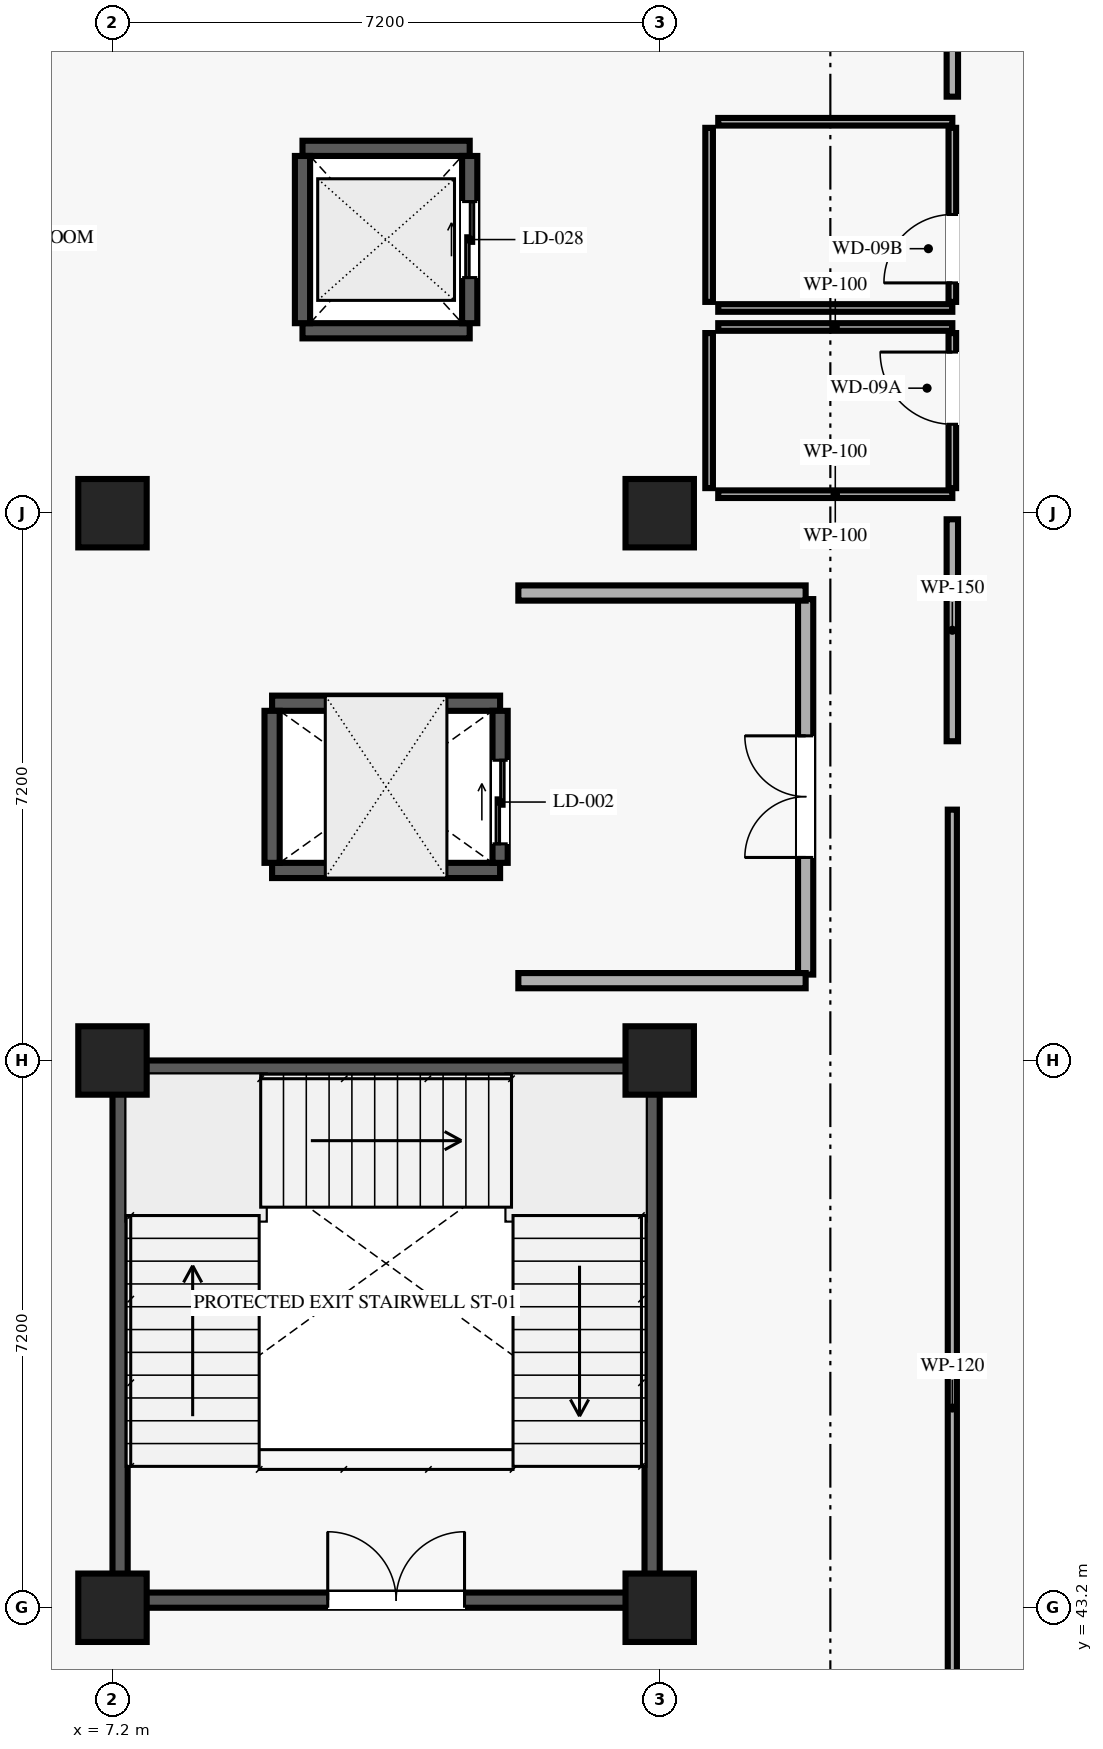
"""IFC4 building model, lengths in metres.
Left out: names, types, materials, properties, quantities, classifications, styles, units other than length and angle.
Written with IfcOpenShell. Run it as: python <this file> out.ifc"""

import sys

from ifc_helpers import new_model, si_unit, direction, frame, frame_2d, origin, origin_2d, place, context, subcontext, project, spatial, rectangle, extrude, element, fill, save


model = new_model("IFC4")
c1 = context("Model", 3, precision=1e-05, world=origin(), true_north=direction((0.0, 1.0)))
c2 = subcontext(c1, "Body", "Model", "MODEL_VIEW")
j1 = project(units=[si_unit("LENGTHUNIT", "METRE"), si_unit("PLANEANGLEUNIT", "RADIAN")], contexts=[c1])
p1 = place(None, origin())
s1 = spatial("IfcSite", under=j1, at=p1, CompositionType="ELEMENT")
p2 = place(p1, origin())
s2 = spatial("IfcBuilding", under=s1, at=p2, CompositionType="ELEMENT")
p3 = place(p2, origin())
s3 = spatial("IfcBuildingStorey", under=s2, at=p3, CompositionType="ELEMENT", Elevation=0.0)
for number, where, z_axis, x_axis in (
    (1, (7.2, 43.2, 0.0), (0.0, 0.0, 1.0), (1.0, 0.0, 0.0)),
    (2, (7.2, 50.4, 0.0), (0.0, 0.0, 1.0), (1.0, 0.0, 0.0)),
    (3, (7.2, 57.6, 0.0), (0.0, 0.0, 1.0), (1.0, 0.0, 0.0)),
    (4, (14.4, 43.2, 0.0), (0.0, 0.0, 1.0), (1.0, 0.0, 0.0)),
    (5, (14.4, 50.4, 0.0), (0.0, 0.0, 1.0), (1.0, 0.0, 0.0)),
    (6, (14.4, 57.6, 0.0), (0.0, 0.0, 1.0), (1.0, 0.0, 0.0)),
):
    element("IfcColumn", number, at=place(p3, frame(where, z_axis=z_axis, x_axis=x_axis)), inside=s3, PredefinedType="COLUMN", context=c2, shape_type="SweptSolid", body=[
        extrude(rectangle(XDim=0.9, YDim=0.9, at=origin_2d()), origin(), (0.0, 0.0, 1.0), 5.4),
    ])
p4 = place(p3, frame((7.4, 43.3, 0.0), z_axis=(0.0, 0.0, 1.0), x_axis=(1.0, 0.0, 0.0)))
e7 = element("IfcWall", 7, at=p4, inside=s3, PredefinedType="SHEAR", context=c2, shape_type="SweptSolid", body=[
    extrude(rectangle(XDim=6.8, YDim=0.2, at=frame_2d((3.4, 0.0))), origin(), (0.0, 0.0, 1.0), 5.16),
])
p5 = place(p4, frame((2.632, 0.0, 0.0)))
e8 = element("IfcOpeningElement", 8, at=p5, cuts=e7, PredefinedType="OPENING", context=c2, shape_type="SweptSolid", body=[
    extrude(rectangle(XDim=1.8, YDim=2.2, at=frame_2d((0.9, 1.1))), frame((0.0, 0.11, 0.0), z_axis=(0.0, -1.0, 0.0), x_axis=(1.0, 0.0, 0.0)), (0.0, 0.0, 1.0), 0.22),
])
for number, where, z_axis, x_axis in (
    (9, (7.4, 50.3, 0.0), (0.0, 0.0, 1.0), (1.0, 0.0, 0.0)),
    (10, (7.3, 43.4, 0.0), (0.0, 0.0, 1.0), (0.0, 1.0, 0.0)),
    (11, (14.3, 43.4, 0.0), (0.0, 0.0, 1.0), (0.0, 1.0, 0.0)),
):
    element("IfcWall", number, at=place(p3, frame(where, z_axis=z_axis, x_axis=x_axis)), inside=s3, PredefinedType="SHEAR", context=c2, shape_type="SweptSolid", body=[
        extrude(rectangle(XDim=6.8, YDim=0.2, at=frame_2d((3.4, 0.0))), origin(), (0.0, 0.0, 1.0), 5.16),
    ])
for number, where, z_axis, x_axis in (
    (12, (9.3, 52.9, 0.0), (0.0, 0.0, 1.0), (1.0, 0.0, 0.0)),
    (13, (9.3, 55.1, 0.0), (0.0, 0.0, 1.0), (1.0, 0.0, 0.0)),
):
    element("IfcWall", number, at=place(p3, frame(where, z_axis=z_axis, x_axis=x_axis)), inside=s3, PredefinedType="SHEAR", context=c2, shape_type="SweptSolid", body=[
        extrude(rectangle(XDim=3.0, YDim=0.2, at=frame_2d((1.5, 0.0))), origin(), (0.0, 0.0, 1.0), 5.16),
    ])
p6 = place(p3, frame((9.3, 53.0, 0.0), z_axis=(0.0, 0.0, 1.0), x_axis=(0.0, 1.0, 0.0)))
e14 = element("IfcWall", 14, at=p6, inside=s3, PredefinedType="SHEAR", context=c2, shape_type="SweptSolid", body=[
    extrude(rectangle(XDim=2.0, YDim=0.2, at=frame_2d((1.0, 0.0))), origin(), (0.0, 0.0, 1.0), 5.16),
])
p7 = place(p3, frame((12.3, 53.0, 0.0), z_axis=(0.0, 0.0, 1.0), x_axis=(0.0, 1.0, 0.0)))
e15 = element("IfcWall", 15, at=p7, inside=s3, PredefinedType="SHEAR", context=c2, shape_type="SweptSolid", body=[
    extrude(rectangle(XDim=2.0, YDim=0.2, at=frame_2d((1.0, 0.0))), origin(), (0.0, 0.0, 1.0), 5.16),
])
p8 = place(p7, frame((0.25, 0.0, 0.0)))
e16 = element("IfcOpeningElement", 16, at=p8, cuts=e15, PredefinedType="OPENING", context=c2, shape_type="SweptSolid", body=[
    extrude(rectangle(XDim=1.1, YDim=2.15, at=frame_2d((0.55, 1.075))), frame((0.0, 0.11, 0.0), z_axis=(0.0, -1.0, 0.0), x_axis=(1.0, 0.0, 0.0)), (0.0, 0.0, 1.0), 0.22),
])
for number, where, z_axis, x_axis in (
    (17, (9.7, 60.0, 0.0), (0.0, 0.0, 1.0), (1.0, 0.0, 0.0)),
    (18, (9.7, 62.4, 0.0), (0.0, 0.0, 1.0), (1.0, 0.0, 0.0)),
    (19, (9.7, 60.1, 0.0), (0.0, 0.0, 1.0), (0.0, 1.0, 0.0)),
):
    element("IfcWall", number, at=place(p3, frame(where, z_axis=z_axis, x_axis=x_axis)), inside=s3, PredefinedType="SHEAR", context=c2, shape_type="SweptSolid", body=[
        extrude(rectangle(XDim=2.2, YDim=0.2, at=frame_2d((1.1, 0.0))), origin(), (0.0, 0.0, 1.0), 5.16),
    ])
p9 = place(p3, frame((11.9, 60.1, 0.0), z_axis=(0.0, 0.0, 1.0), x_axis=(0.0, 1.0, 0.0)))
e20 = element("IfcWall", 20, at=p9, inside=s3, PredefinedType="SHEAR", context=c2, shape_type="SweptSolid", body=[
    extrude(rectangle(XDim=2.2, YDim=0.2, at=frame_2d((1.1, 0.0))), origin(), (0.0, 0.0, 1.0), 5.16),
])
p10 = place(p9, frame((0.6, 0.0, 0.0)))
e21 = element("IfcOpeningElement", 21, at=p10, cuts=e20, PredefinedType="OPENING", context=c2, shape_type="SweptSolid", body=[
    extrude(rectangle(XDim=1.0, YDim=2.1, at=frame_2d((0.5, 1.05))), frame((0.0, 0.11, 0.0), z_axis=(0.0, -1.0, 0.0), x_axis=(1.0, 0.0, 0.0)), (0.0, 0.0, 1.0), 0.22),
])
p11 = place(p3, frame((16.32, 51.53, 0.0), z_axis=(0.0, 0.0, 1.0), x_axis=(0.0, 1.0, 0.0)))
e22 = element("IfcWall", 22, at=p11, inside=s3, PredefinedType="SOLIDWALL", context=c2, shape_type="SweptSolid", body=[
    extrude(rectangle(XDim=4.94, YDim=0.2, at=frame_2d((2.47, 0.0))), origin(), (0.0, 0.0, 1.0), 5.16),
])
p12 = place(p11, frame((1.541, 0.0, 0.0)))
e23 = element("IfcOpeningElement", 23, at=p12, cuts=e22, PredefinedType="OPENING", context=c2, shape_type="SweptSolid", body=[
    extrude(rectangle(XDim=1.6, YDim=2.2, at=frame_2d((0.8, 1.1))), frame((0.0, 0.11, 0.0), z_axis=(0.0, -1.0, 0.0), x_axis=(1.0, 0.0, 0.0)), (0.0, 0.0, 1.0), 0.22),
])
for number, where, z_axis, x_axis in (
    (24, (12.54, 51.45, 0.0), (0.0, 0.0, 1.0), (1.0, 0.0, 0.0)),
    (25, (12.54, 56.55, 0.0), (0.0, 0.0, 1.0), (1.0, 0.0, 0.0)),
):
    element("IfcWall", number, at=place(p3, frame(where, z_axis=z_axis, x_axis=x_axis)), inside=s3, PredefinedType="SOLIDWALL", context=c2, shape_type="SweptSolid", body=[
        extrude(rectangle(XDim=3.78, YDim=0.2, at=frame_2d((1.89, 0.0))), origin(), (0.0, 0.0, 1.0), 5.16),
    ])
p13 = place(p3, frame((18.25, 57.93, 0.0), z_axis=(0.0, 0.0, 1.0), x_axis=(0.0, 1.0, 0.0)))
e26 = element("IfcWall", 26, at=p13, inside=s3, PredefinedType="PARTITIONING", context=c2, shape_type="SweptSolid", body=[
    extrude(rectangle(XDim=2.04, YDim=0.1, at=frame_2d((1.02, 0.0))), origin(), (0.0, 0.0, 1.0), 5.16),
])
p14 = place(p13, frame((0.84, 0.0, 0.0)))
e27 = element("IfcOpeningElement", 27, at=p14, cuts=e26, PredefinedType="OPENING", context=c2, shape_type="SweptSolid", body=[
    extrude(rectangle(XDim=0.95, YDim=2.1, at=frame_2d((0.475, 1.05))), frame((0.0, 0.06, 0.0), z_axis=(0.0, -1.0, 0.0), x_axis=(1.0, 0.0, 0.0)), (0.0, 0.0, 1.0), 0.12),
])
p15 = place(p3, frame((15.17, 57.85, 0.0), z_axis=(0.0, 0.0, 1.0), x_axis=(1.0, 0.0, 0.0)))
e28 = element("IfcWall", 28, at=p15, inside=s3, PredefinedType="PARTITIONING", context=c2, shape_type="SweptSolid", body=[
    extrude(rectangle(XDim=3.08, YDim=0.1, at=frame_2d((1.54, 0.0))), origin(), (0.0, 0.0, 1.0), 4.5),
])
p16 = place(p3, frame((15.17, 60.05, 0.0), z_axis=(0.0, 0.0, 1.0), x_axis=(1.0, 0.0, 0.0)))
e29 = element("IfcWall", 29, at=p16, inside=s3, PredefinedType="PARTITIONING", context=c2, shape_type="SweptSolid", body=[
    extrude(rectangle(XDim=3.08, YDim=0.1, at=frame_2d((1.54, 0.0))), origin(), (0.0, 0.0, 1.0), 5.16),
])
p17 = place(p3, frame((15.05, 57.93, 0.0), z_axis=(0.0, 0.0, 1.0), x_axis=(0.0, 1.0, 0.0)))
e30 = element("IfcWall", 30, at=p17, inside=s3, PredefinedType="PARTITIONING", context=c2, shape_type="SweptSolid", body=[
    extrude(rectangle(XDim=2.04, YDim=0.1, at=frame_2d((1.02, 0.0))), origin(), (0.0, 0.0, 1.0), 5.16),
])
p18 = place(p3, frame((18.25, 60.38, 0.0), z_axis=(0.0, 0.0, 1.0), x_axis=(0.0, 1.0, 0.0)))
e31 = element("IfcWall", 31, at=p18, inside=s3, PredefinedType="PARTITIONING", context=c2, shape_type="SweptSolid", body=[
    extrude(rectangle(XDim=2.29, YDim=0.1, at=frame_2d((1.145, 0.0))), origin(), (0.0, 0.0, 1.0), 5.16),
])
p19 = place(p18, frame((0.25, 0.0, 0.0)))
e32 = element("IfcOpeningElement", 32, at=p19, cuts=e31, PredefinedType="OPENING", context=c2, shape_type="SweptSolid", body=[
    extrude(rectangle(XDim=0.9, YDim=2.1, at=frame_2d((0.45, 1.05))), frame((0.0, 0.06, 0.0), z_axis=(0.0, -1.0, 0.0), x_axis=(1.0, 0.0, 0.0)), (0.0, 0.0, 1.0), 0.12),
])
for number, where, z_axis, x_axis in (
    (33, (15.17, 60.3, 0.0), (0.0, 0.0, 1.0), (1.0, 0.0, 0.0)),
    (34, (15.17, 62.75, 0.0), (0.0, 0.0, 1.0), (1.0, 0.0, 0.0)),
):
    element("IfcWall", number, at=place(p3, frame(where, z_axis=z_axis, x_axis=x_axis)), inside=s3, PredefinedType="PARTITIONING", context=c2, shape_type="SweptSolid", body=[
        extrude(rectangle(XDim=3.08, YDim=0.1, at=frame_2d((1.54, 0.0))), origin(), (0.0, 0.0, 1.0), 5.16),
    ])
p20 = place(p3, frame((15.05, 60.38, 0.0), z_axis=(0.0, 0.0, 1.0), x_axis=(0.0, 1.0, 0.0)))
e35 = element("IfcWall", 35, at=p20, inside=s3, PredefinedType="PARTITIONING", context=c2, shape_type="SweptSolid", body=[
    extrude(rectangle(XDim=2.29, YDim=0.1, at=frame_2d((1.145, 0.0))), origin(), (0.0, 0.0, 1.0), 5.16),
])
p21 = place(p3, frame((18.25, 36.55, 0.0), z_axis=(0.0, 0.0, 1.0), x_axis=(0.0, 1.0, 0.0)))
e36 = element("IfcWall", 36, at=p21, inside=s3, PredefinedType="PARTITIONING", context=c2, shape_type="SweptSolid", body=[
    extrude(rectangle(XDim=17.15, YDim=0.12, at=frame_2d((8.575, 0.0))), origin(), (0.0, 0.0, 1.0), 5.16),
])
p22 = place(p21, frame((2.525, 0.0, 0.0)))
e37 = element("IfcOpeningElement", 37, at=p22, cuts=e36, PredefinedType="OPENING", context=c2, shape_type="SweptSolid", body=[
    extrude(rectangle(XDim=0.98, YDim=2.1, at=frame_2d((0.49, 1.05))), frame((0.0, 0.07, 0.0), z_axis=(0.0, -1.0, 0.0), x_axis=(1.0, 0.0, 0.0)), (0.0, 0.0, 1.0), 0.14),
])
p23 = place(p3, frame((18.25, 63.08, 0.0), z_axis=(0.0, 0.0, 1.0), x_axis=(0.0, 1.0, 0.0)))
e38 = element("IfcWall", 38, at=p23, inside=s3, PredefinedType="PARTITIONING", context=c2, shape_type="SweptSolid", body=[
    extrude(rectangle(XDim=8.62, YDim=0.15, at=frame_2d((4.31, 0.0))), origin(), (0.0, 0.0, 1.0), 5.16),
])
p24 = place(p23, frame((4.263, 0.0, 0.0)))
e39 = element("IfcOpeningElement", 39, at=p24, cuts=e38, PredefinedType="OPENING", context=c2, shape_type="SweptSolid", body=[
    extrude(rectangle(XDim=2.1, YDim=2.4, at=frame_2d((1.05, 1.2))), frame((0.0, 0.085, 0.0), z_axis=(0.0, -1.0, 0.0), x_axis=(1.0, 0.0, 0.0)), (0.0, 0.0, 1.0), 0.17),
])
p25 = place(p3, frame((18.25, 54.6, 0.0), z_axis=(0.0, 0.0, 1.0), x_axis=(0.0, 1.0, 0.0)))
e40 = element("IfcWall", 40, at=p25, inside=s3, PredefinedType="PARTITIONING", context=c2, shape_type="SweptSolid", body=[
    extrude(rectangle(XDim=2.92, YDim=0.15, at=frame_2d((1.46, 0.0))), origin(), (0.0, 0.0, 1.0), 5.16),
])
p26 = place(p5, origin())
e41 = element("IfcDoor", 41, at=p26, inside=s3, OperationType="DOUBLE_DOOR_SINGLE_SWING", PredefinedType="DOOR", context=c2, shape_type="SweptSolid", body=[
    extrude(rectangle(XDim=1.8, YDim=2.2, at=frame_2d((0.9, 1.1))), frame((0.0, 0.025, 0.0), z_axis=(0.0, -1.0, 0.0), x_axis=(1.0, 0.0, 0.0)), (0.0, 0.0, 1.0), 0.05),
])
fill(e8, e41)
p27 = place(p8, origin())
e42 = element("IfcDoor", 42, at=p27, inside=s3, OperationType="DOUBLE_DOOR_SLIDING", PredefinedType="DOOR", context=c2, shape_type="SweptSolid", body=[
    extrude(rectangle(XDim=1.1, YDim=2.15, at=frame_2d((0.55, 1.075))), frame((0.0, 0.025, 0.0), z_axis=(0.0, -1.0, 0.0), x_axis=(1.0, 0.0, 0.0)), (0.0, 0.0, 1.0), 0.05),
])
fill(e16, e42)
p28 = place(p10, origin())
e43 = element("IfcDoor", 43, at=p28, inside=s3, OperationType="DOUBLE_DOOR_SLIDING", PredefinedType="DOOR", context=c2, shape_type="SweptSolid", body=[
    extrude(rectangle(XDim=1.0, YDim=2.1, at=frame_2d((0.5, 1.05))), frame((0.0, 0.025, 0.0), z_axis=(0.0, -1.0, 0.0), x_axis=(1.0, 0.0, 0.0)), (0.0, 0.0, 1.0), 0.05),
])
fill(e21, e43)
p29 = place(p12, origin())
e44 = element("IfcDoor", 44, at=p29, inside=s3, OperationType="DOUBLE_DOOR_SINGLE_SWING", PredefinedType="DOOR", context=c2, shape_type="SweptSolid", body=[
    extrude(rectangle(XDim=1.6, YDim=2.2, at=frame_2d((0.8, 1.1))), frame((0.0, 0.025, 0.0), z_axis=(0.0, -1.0, 0.0), x_axis=(1.0, 0.0, 0.0)), (0.0, 0.0, 1.0), 0.05),
])
fill(e23, e44)
p30 = place(p14, origin())
e45 = element("IfcDoor", 45, at=p30, inside=s3, OperationType="SINGLE_SWING_RIGHT", PredefinedType="DOOR", context=c2, shape_type="SweptSolid", body=[
    extrude(rectangle(XDim=0.95, YDim=2.1, at=frame_2d((0.475, 1.05))), frame((0.0, 0.025, 0.0), z_axis=(0.0, -1.0, 0.0), x_axis=(1.0, 0.0, 0.0)), (0.0, 0.0, 1.0), 0.05),
])
fill(e27, e45)
p31 = place(p19, origin())
e46 = element("IfcDoor", 46, at=p31, inside=s3, OperationType="SINGLE_SWING_LEFT", PredefinedType="DOOR", context=c2, shape_type="SweptSolid", body=[
    extrude(rectangle(XDim=0.9, YDim=2.1, at=frame_2d((0.45, 1.05))), frame((0.0, 0.025, 0.0), z_axis=(0.0, -1.0, 0.0), x_axis=(1.0, 0.0, 0.0)), (0.0, 0.0, 1.0), 0.05),
])
fill(e32, e46)
save(model, sys.argv[1])
